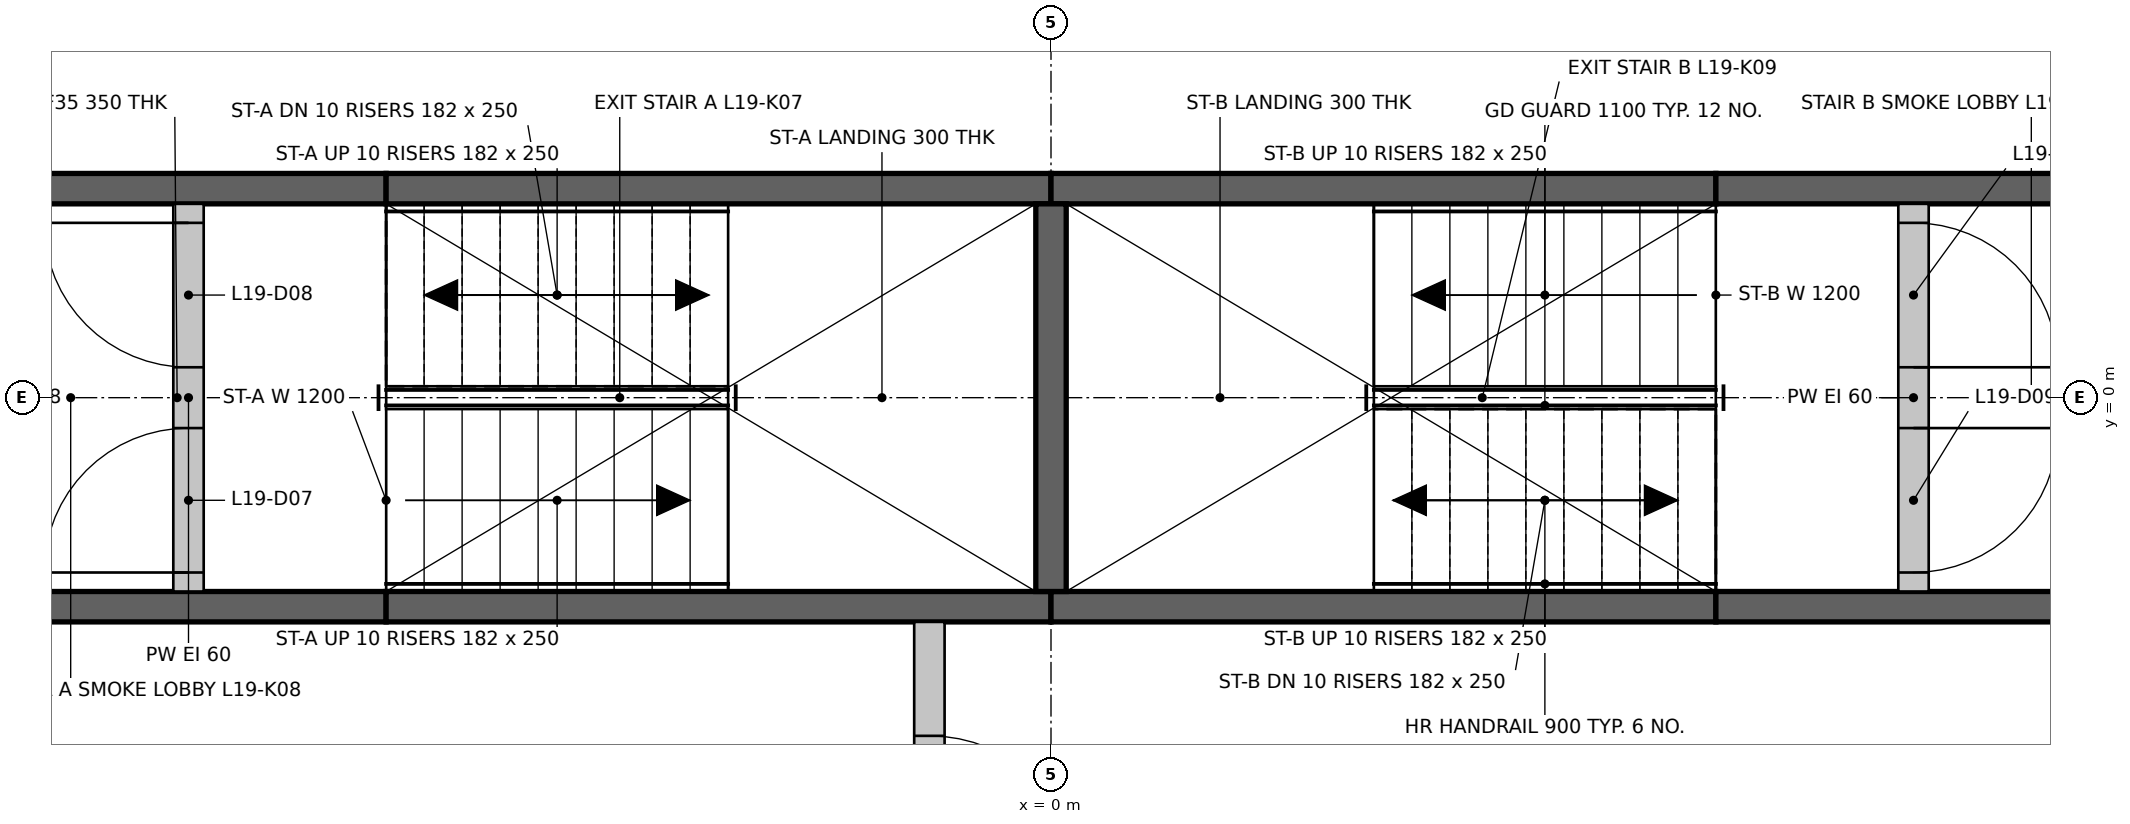
"""IFC4 building model, lengths in metres.
Left out: names, types, materials, properties, quantities, classifications, styles, units other than length and angle.
Written with IfcOpenShell. Run it as: python <this file> out.ifc"""

import sys

from ifc_helpers import new_model, si_unit, direction, frame, frame_2d, origin, place, context, subcontext, project, spatial, rectangle, extrude, element, fill, save


model = new_model("IFC4")
c1 = context("Model", 3, precision=1e-05, world=origin(), true_north=direction((0.0, 1.0)))
c2 = subcontext(c1, "Body", "Model", "MODEL_VIEW")
j1 = project(units=[si_unit("LENGTHUNIT", "METRE"), si_unit("PLANEANGLEUNIT", "RADIAN")], contexts=[c1])
p1 = place(None, origin())
s1 = spatial("IfcSite", under=j1, at=p1, CompositionType="ELEMENT")
p2 = place(p1, origin())
s2 = spatial("IfcBuilding", under=s1, at=p2, CompositionType="ELEMENT")
p3 = place(p2, frame((0.0, 0.0, 80.05)))
s3 = spatial("IfcBuildingStorey", under=s2, at=p3, CompositionType="ELEMENT", Elevation=80.05)
p4 = place(p3, frame((-7.124, -1.375, 0.0), z_axis=(0.0, 0.0, 1.0), x_axis=(1.0, 0.0, 0.0)))
e1 = element("IfcWall", 1, at=p4, inside=s3, PredefinedType="SHEAR", context=c2, shape_type="SweptSolid", body=[
    extrude(rectangle(XDim=2.75, YDim=0.2, at=frame_2d((1.375, 0.0))), origin(), (0.0, 0.0, 1.0), 3.3),
])
for number, where, z_axis, x_axis in (
    (2, (-4.374, -1.375, 0.0), (0.0, 0.0, 1.0), (1.0, 0.0, 0.0)),
    (3, (0.0, -1.375, 0.0), (0.0, 0.0, 1.0), (1.0, 0.0, 0.0)),
):
    element("IfcWall", number, at=place(p3, frame(where, z_axis=z_axis, x_axis=x_axis)), inside=s3, PredefinedType="SHEAR", context=c2, shape_type="SweptSolid", body=[
        extrude(rectangle(XDim=4.374, YDim=0.2, at=frame_2d((2.187, 0.0))), origin(), (0.0, 0.0, 1.0), 3.3),
    ])
for number, where, z_axis, x_axis in (
    (4, (4.374, -1.375, 0.0), (0.0, 0.0, 1.0), (1.0, 0.0, 0.0)),
    (5, (-7.124, 1.375, 0.0), (0.0, 0.0, 1.0), (1.0, 0.0, 0.0)),
):
    element("IfcWall", number, at=place(p3, frame(where, z_axis=z_axis, x_axis=x_axis)), inside=s3, PredefinedType="SHEAR", context=c2, shape_type="SweptSolid", body=[
        extrude(rectangle(XDim=2.75, YDim=0.2, at=frame_2d((1.375, 0.0))), origin(), (0.0, 0.0, 1.0), 3.3),
    ])
for number, where, z_axis, x_axis in (
    (6, (-4.374, 1.375, 0.0), (0.0, 0.0, 1.0), (1.0, 0.0, 0.0)),
    (7, (0.0, 1.375, 0.0), (0.0, 0.0, 1.0), (1.0, 0.0, 0.0)),
):
    element("IfcWall", number, at=place(p3, frame(where, z_axis=z_axis, x_axis=x_axis)), inside=s3, PredefinedType="SHEAR", context=c2, shape_type="SweptSolid", body=[
        extrude(rectangle(XDim=4.374, YDim=0.2, at=frame_2d((2.187, 0.0))), origin(), (0.0, 0.0, 1.0), 3.3),
    ])
p5 = place(p3, frame((4.374, 1.375, 0.0), z_axis=(0.0, 0.0, 1.0), x_axis=(1.0, 0.0, 0.0)))
e8 = element("IfcWall", 8, at=p5, inside=s3, PredefinedType="SHEAR", context=c2, shape_type="SweptSolid", body=[
    extrude(rectangle(XDim=2.75, YDim=0.2, at=frame_2d((1.375, 0.0))), origin(), (0.0, 0.0, 1.0), 3.3),
])
p6 = place(p3, frame((0.0, -1.275, 0.0), z_axis=(0.0, 0.0, 1.0), x_axis=(0.0, 1.0, 0.0)))
e9 = element("IfcWall", 9, at=p6, inside=s3, PredefinedType="SHEAR", context=c2, shape_type="SweptSolid", body=[
    extrude(rectangle(XDim=2.55, YDim=0.2, at=frame_2d((1.275, 0.0))), origin(), (0.0, 0.0, 1.0), 3.3),
])
p7 = place(p3, frame((-0.8, -3.974, 0.0), z_axis=(0.0, 0.0, 1.0), x_axis=(0.0, 1.0, 0.0)))
e10 = element("IfcWall", 10, at=p7, inside=s3, PredefinedType="PARTITIONING", context=c2, shape_type="SweptSolid", body=[
    extrude(rectangle(XDim=2.499, YDim=0.2, at=frame_2d((1.25, 0.0))), origin(), (0.0, 0.0, 1.0), 3.3),
])
p8 = place(p7, frame((0.75, 0.0, 0.0)))
e11 = element("IfcOpeningElement", 11, at=p8, cuts=e10, PredefinedType="OPENING", context=c2, shape_type="SweptSolid", body=[
    extrude(rectangle(XDim=1.0, YDim=2.1, at=frame_2d((0.5, 1.05))), frame((0.0, 0.11, 0.0), z_axis=(0.0, -1.0, 0.0), x_axis=(1.0, 0.0, 0.0)), (0.0, 0.0, 1.0), 0.22),
])
p9 = place(p3, frame((-5.674, -1.275, 0.0), z_axis=(0.0, 0.0, 1.0), x_axis=(0.0, 1.0, 0.0)))
e12 = element("IfcWall", 12, at=p9, inside=s3, PredefinedType="PARTITIONING", context=c2, shape_type="SweptSolid", body=[
    extrude(rectangle(XDim=2.55, YDim=0.2, at=frame_2d((1.275, 0.0))), origin(), (0.0, 0.0, 1.0), 3.3),
])
p10 = place(p9, frame((0.125, 0.0, 0.0)))
e13 = element("IfcOpeningElement", 13, at=p10, cuts=e12, PredefinedType="OPENING", context=c2, shape_type="SweptSolid", body=[
    extrude(rectangle(XDim=0.95, YDim=2.1, at=frame_2d((0.475, 1.05))), frame((0.0, 0.11, 0.0), z_axis=(0.0, -1.0, 0.0), x_axis=(1.0, 0.0, 0.0)), (0.0, 0.0, 1.0), 0.22),
])
p11 = place(p9, frame((1.475, 0.0, 0.0)))
e14 = element("IfcOpeningElement", 14, at=p11, cuts=e12, PredefinedType="OPENING", context=c2, shape_type="SweptSolid", body=[
    extrude(rectangle(XDim=0.95, YDim=2.1, at=frame_2d((0.475, 1.05))), frame((0.0, 0.11, 0.0), z_axis=(0.0, -1.0, 0.0), x_axis=(1.0, 0.0, 0.0)), (0.0, 0.0, 1.0), 0.22),
])
p12 = place(p3, frame((5.674, -1.275, 0.0), z_axis=(0.0, 0.0, 1.0), x_axis=(0.0, 1.0, 0.0)))
e15 = element("IfcWall", 15, at=p12, inside=s3, PredefinedType="PARTITIONING", context=c2, shape_type="SweptSolid", body=[
    extrude(rectangle(XDim=2.55, YDim=0.2, at=frame_2d((1.275, 0.0))), origin(), (0.0, 0.0, 1.0), 3.3),
])
p13 = place(p12, frame((0.125, 0.0, 0.0)))
e16 = element("IfcOpeningElement", 16, at=p13, cuts=e15, PredefinedType="OPENING", context=c2, shape_type="SweptSolid", body=[
    extrude(rectangle(XDim=0.95, YDim=2.1, at=frame_2d((0.475, 1.05))), frame((0.0, 0.11, 0.0), z_axis=(0.0, -1.0, 0.0), x_axis=(1.0, 0.0, 0.0)), (0.0, 0.0, 1.0), 0.22),
])
p14 = place(p12, frame((1.475, 0.0, 0.0)))
e17 = element("IfcOpeningElement", 17, at=p14, cuts=e15, PredefinedType="OPENING", context=c2, shape_type="SweptSolid", body=[
    extrude(rectangle(XDim=0.95, YDim=2.1, at=frame_2d((0.475, 1.05))), frame((0.0, 0.11, 0.0), z_axis=(0.0, -1.0, 0.0), x_axis=(1.0, 0.0, 0.0)), (0.0, 0.0, 1.0), 0.22),
])
p15 = place(p10, origin())
e18 = element("IfcDoor", 18, at=p15, inside=s3, OperationType="SINGLE_SWING_LEFT", PredefinedType="DOOR", context=c2, shape_type="SweptSolid", body=[
    extrude(rectangle(XDim=0.95, YDim=2.1, at=frame_2d((0.475, 1.05))), frame((0.0, 0.025, 0.0), z_axis=(0.0, -1.0, 0.0), x_axis=(1.0, 0.0, 0.0)), (0.0, 0.0, 1.0), 0.05),
])
fill(e13, e18)
p16 = place(p11, origin())
e19 = element("IfcDoor", 19, at=p16, inside=s3, OperationType="SINGLE_SWING_RIGHT", PredefinedType="DOOR", context=c2, shape_type="SweptSolid", body=[
    extrude(rectangle(XDim=0.95, YDim=2.1, at=frame_2d((0.475, 1.05))), frame((0.0, 0.025, 0.0), z_axis=(0.0, -1.0, 0.0), x_axis=(1.0, 0.0, 0.0)), (0.0, 0.0, 1.0), 0.05),
])
fill(e14, e19)
p17 = place(p13, frame((0.95, 0.0, 0.0), z_axis=(0.0, 0.0, 1.0), x_axis=(-1.0, 0.0, 0.0)))
e20 = element("IfcDoor", 20, at=p17, inside=s3, OperationType="SINGLE_SWING_RIGHT", PredefinedType="DOOR", context=c2, shape_type="SweptSolid", body=[
    extrude(rectangle(XDim=0.95, YDim=2.1, at=frame_2d((0.475, 1.05))), frame((0.0, 0.025, 0.0), z_axis=(0.0, -1.0, 0.0), x_axis=(1.0, 0.0, 0.0)), (0.0, 0.0, 1.0), 0.05),
])
fill(e16, e20)
p18 = place(p14, frame((0.95, 0.0, 0.0), z_axis=(0.0, 0.0, 1.0), x_axis=(-1.0, 0.0, 0.0)))
e21 = element("IfcDoor", 21, at=p18, inside=s3, OperationType="SINGLE_SWING_LEFT", PredefinedType="DOOR", context=c2, shape_type="SweptSolid", body=[
    extrude(rectangle(XDim=0.95, YDim=2.1, at=frame_2d((0.475, 1.05))), frame((0.0, 0.025, 0.0), z_axis=(0.0, -1.0, 0.0), x_axis=(1.0, 0.0, 0.0)), (0.0, 0.0, 1.0), 0.05),
])
fill(e17, e21)
p19 = place(p8, frame((1.0, 0.0, 0.0), z_axis=(0.0, 0.0, 1.0), x_axis=(-1.0, 0.0, 0.0)))
e22 = element("IfcDoor", 22, at=p19, inside=s3, OperationType="SINGLE_SWING_LEFT", PredefinedType="DOOR", context=c2, shape_type="SweptSolid", body=[
    extrude(rectangle(XDim=1.0, YDim=2.1, at=frame_2d((0.5, 1.05))), frame((0.0, 0.025, 0.0), z_axis=(0.0, -1.0, 0.0), x_axis=(1.0, 0.0, 0.0)), (0.0, 0.0, 1.0), 0.05),
])
fill(e11, e22)
save(model, sys.argv[1])
